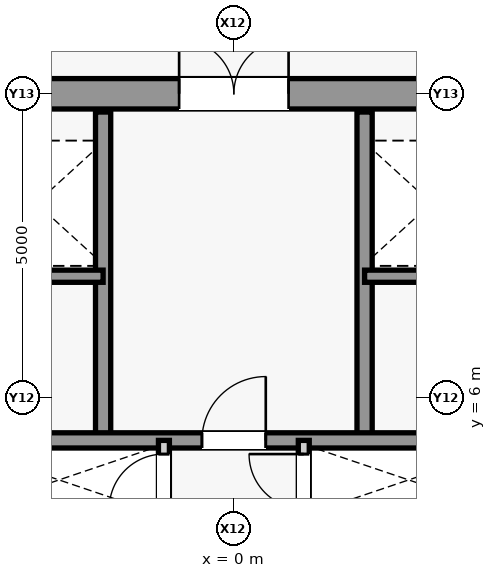
"""IFC4 building model, lengths in metres.
Left out: names, types, materials, properties, quantities, classifications, styles, units other than length and angle.
Written with IfcOpenShell. Run it as: python <this file> out.ifc"""

import sys

from ifc_helpers import new_model, si_unit, direction, frame, frame_2d, origin, place, context, subcontext, project, spatial, rectangle, extrude, source, transform, mapped, element, fill, save


model = new_model("IFC4")
c1 = context("Model", 3, precision=1e-05, world=origin(), true_north=direction((0.0, 1.0)))
c2 = subcontext(c1, "Body", "Model", "MODEL_VIEW")
j1 = project(units=[si_unit("LENGTHUNIT", "METRE"), si_unit("PLANEANGLEUNIT", "RADIAN")], contexts=[c1])
p1 = place(None, origin())
s1 = spatial("IfcSite", under=j1, at=p1, CompositionType="ELEMENT")
p2 = place(p1, origin())
s2 = spatial("IfcBuilding", under=s1, at=p2, CompositionType="ELEMENT")
p3 = place(p2, frame((0.0, 0.0, 32.6)))
s3 = spatial("IfcBuildingStorey", under=s2, at=p3, CompositionType="ELEMENT", Elevation=32.6)
m1 = source(origin(), c2, "Body", "SweptSolid", [
    extrude(rectangle(XDim=9.2, YDim=0.5, at=frame_2d((4.6, 0.0))), origin(), (0.0, 0.0, 1.0), 3.94),
])
p4 = place(p3, frame((-4.6, 11.0, 0.0), z_axis=(0.0, 0.0, 1.0), x_axis=(1.0, 0.0, 0.0)))
e1 = element("IfcWall", 1, at=p4, inside=s3, PredefinedType="SHEAR", context=c2, shape_type="MappedRepresentation", body=[
    mapped(m1, transform((0.0, 0.0, 0.0), scale=1.0)),
])
m2 = source(origin(), c2, "Body", "SweptSolid", [
    extrude(rectangle(XDim=1.8, YDim=2.25, at=frame_2d((0.9, 1.125))), frame((0.0, 0.26, 0.0), z_axis=(0.0, -1.0, 0.0), x_axis=(1.0, 0.0, 0.0)), (0.0, 0.0, 1.0), 0.52),
])
p5 = place(p4, frame((3.7, 0.0, 0.0)))
e2 = element("IfcOpeningElement", 2, at=p5, cuts=e1, PredefinedType="OPENING", context=c2, shape_type="MappedRepresentation", body=[
    mapped(m2, transform((0.0, 0.0, 0.0), scale=1.0)),
])
m3 = source(origin(), c2, "Body", "SweptSolid", [
    extrude(rectangle(XDim=5.4, YDim=0.25, at=frame_2d((2.7, 0.0))), origin(), (0.0, 0.0, 1.0), 3.94),
])
for number, where, z_axis, x_axis in (
    (3, (-2.15, 5.3, 0.0), (0.0, 0.0, 1.0), (0.0, 1.0, 0.0)),
    (4, (2.15, 5.3, 0.0), (0.0, 0.0, 1.0), (0.0, 1.0, 0.0)),
):
    element("IfcWall", number, at=place(p3, frame(where, z_axis=z_axis, x_axis=x_axis)), inside=s3, PredefinedType="SHEAR", context=c2, shape_type="MappedRepresentation", body=[
        mapped(m3, transform((0.0, 0.0, 0.0), scale=1.0)),
    ])
m4 = source(origin(), c2, "Body", "SweptSolid", [
    extrude(rectangle(XDim=2.45, YDim=0.2, at=frame_2d((1.225, 0.0))), origin(), (0.0, 0.0, 1.0), 3.94),
])
for number, where, z_axis, x_axis in (
    (5, (-4.6, 8.0, 0.0), (0.0, 0.0, 1.0), (1.0, 0.0, 0.0)),
    (6, (2.15, 8.0, 0.0), (0.0, 0.0, 1.0), (1.0, 0.0, 0.0)),
):
    element("IfcWall", number, at=place(p3, frame(where, z_axis=z_axis, x_axis=x_axis)), inside=s3, PredefinedType="SHEAR", context=c2, shape_type="MappedRepresentation", body=[
        mapped(m4, transform((0.0, 0.0, 0.0), scale=1.0)),
    ])
m5 = source(origin(), c2, "Body", "SweptSolid", [
    extrude(rectangle(XDim=9.2, YDim=0.25, at=frame_2d((4.6, 0.0))), origin(), (0.0, 0.0, 1.0), 3.94),
])
p6 = place(p3, frame((-4.6, 5.3, 0.0), z_axis=(0.0, 0.0, 1.0), x_axis=(1.0, 0.0, 0.0)))
e7 = element("IfcWall", 7, at=p6, inside=s3, PredefinedType="SHEAR", context=c2, shape_type="MappedRepresentation", body=[
    mapped(m5, transform((0.0, 0.0, 0.0), scale=1.0)),
])
m6 = source(origin(), c2, "Body", "SweptSolid", [
    extrude(rectangle(XDim=1.05, YDim=2.2, at=frame_2d((0.525, 1.1))), frame((0.0, 0.135, 0.0), z_axis=(0.0, -1.0, 0.0), x_axis=(1.0, 0.0, 0.0)), (0.0, 0.0, 1.0), 0.27),
])
p7 = place(p6, frame((4.075, 0.0, 0.0)))
e8 = element("IfcOpeningElement", 8, at=p7, cuts=e7, PredefinedType="OPENING", context=c2, shape_type="MappedRepresentation", body=[
    mapped(m6, transform((0.0, 0.0, 0.0), scale=1.0)),
])
m7 = source(origin(), c2, "Body", "SweptSolid", [
    extrude(rectangle(XDim=10.6, YDim=0.18, at=frame_2d((5.3, 0.0))), origin(), (0.0, 0.0, 1.0), 3.94),
])
p8 = place(p3, frame((-1.15, -5.3, 0.0), z_axis=(0.0, 0.0, 1.0), x_axis=(0.0, 1.0, 0.0)))
e9 = element("IfcWall", 9, at=p8, inside=s3, PredefinedType="PARTITIONING", context=c2, shape_type="MappedRepresentation", body=[
    mapped(m7, transform((0.0, 0.0, 0.0), scale=1.0)),
])
m8 = source(origin(), c2, "Body", "SweptSolid", [
    extrude(rectangle(XDim=0.9, YDim=2.15, at=frame_2d((0.45, 1.075))), frame((0.0, 0.1, 0.0), z_axis=(0.0, -1.0, 0.0), x_axis=(1.0, 0.0, 0.0)), (0.0, 0.0, 1.0), 0.2),
])
p9 = place(p8, frame((1.3, 0.0, 0.0)))
e10 = element("IfcOpeningElement", 10, at=p9, cuts=e9, PredefinedType="OPENING", context=c2, shape_type="MappedRepresentation", body=[
    mapped(m8, transform((0.0, 0.0, 0.0), scale=1.0)),
])
p10 = place(p8, frame((4.9, 0.0, 0.0)))
e11 = element("IfcOpeningElement", 11, at=p10, cuts=e9, PredefinedType="OPENING", context=c2, shape_type="MappedRepresentation", body=[
    mapped(m8, transform((0.0, 0.0, 0.0), scale=1.0)),
])
p11 = place(p8, frame((7.8, 0.0, 0.0)))
e12 = element("IfcOpeningElement", 12, at=p11, cuts=e9, PredefinedType="OPENING", context=c2, shape_type="MappedRepresentation", body=[
    mapped(m8, transform((0.0, 0.0, 0.0), scale=1.0)),
])
p12 = place(p8, frame((9.475, 0.0, 0.0)))
e13 = element("IfcOpeningElement", 13, at=p12, cuts=e9, PredefinedType="OPENING", context=c2, shape_type="MappedRepresentation", body=[
    mapped(m8, transform((0.0, 0.0, 0.0), scale=1.0)),
])
p13 = place(p3, frame((1.15, -5.3, 0.0), z_axis=(0.0, 0.0, 1.0), x_axis=(0.0, 1.0, 0.0)))
e14 = element("IfcWall", 14, at=p13, inside=s3, PredefinedType="PARTITIONING", context=c2, shape_type="MappedRepresentation", body=[
    mapped(m7, transform((0.0, 0.0, 0.0), scale=1.0)),
])
p14 = place(p13, frame((4.2, 0.0, 0.0)))
e15 = element("IfcOpeningElement", 15, at=p14, cuts=e14, PredefinedType="OPENING", context=c2, shape_type="MappedRepresentation", body=[
    mapped(m8, transform((0.0, 0.0, 0.0), scale=1.0)),
])
p15 = place(p13, frame((9.475, 0.0, 0.0)))
e16 = element("IfcOpeningElement", 16, at=p15, cuts=e14, PredefinedType="OPENING", context=c2, shape_type="MappedRepresentation", body=[
    mapped(m8, transform((0.0, 0.0, 0.0), scale=1.0)),
])
m9 = source(origin(), c2, "Body", "SweptSolid", [
    extrude(rectangle(XDim=1.05, YDim=2.2, at=frame_2d((0.525, 1.1))), frame((0.0, 0.025, 0.0), z_axis=(0.0, -1.0, 0.0), x_axis=(1.0, 0.0, 0.0)), (0.0, 0.0, 1.0), 0.05),
])
p16 = place(p7, origin())
e17 = element("IfcDoor", 17, at=p16, inside=s3, OperationType="SINGLE_SWING_RIGHT", PredefinedType="DOOR", context=c2, shape_type="MappedRepresentation", body=[
    mapped(m9, transform((0.0, 0.0, 0.0), scale=1.0)),
])
fill(e8, e17)
m10 = source(origin(), c2, "Body", "SweptSolid", [
    extrude(rectangle(XDim=1.8, YDim=2.25, at=frame_2d((0.9, 1.125))), frame((0.0, 0.025, 0.0), z_axis=(0.0, -1.0, 0.0), x_axis=(1.0, 0.0, 0.0)), (0.0, 0.0, 1.0), 0.05),
])
p17 = place(p5, origin())
e18 = element("IfcDoor", 18, at=p17, inside=s3, OperationType="SINGLE_SWING_RIGHT", PredefinedType="DOOR", context=c2, shape_type="MappedRepresentation", body=[
    mapped(m10, transform((0.0, 0.0, 0.0), scale=1.0)),
])
fill(e2, e18)
m11 = source(origin(), c2, "Body", "SweptSolid", [
    extrude(rectangle(XDim=0.9, YDim=2.15, at=frame_2d((0.45, 1.075))), frame((0.0, 0.025, 0.0), z_axis=(0.0, -1.0, 0.0), x_axis=(1.0, 0.0, 0.0)), (0.0, 0.0, 1.0), 0.05),
])
p18 = place(p12, origin())
e19 = element("IfcDoor", 19, at=p18, inside=s3, OperationType="SINGLE_SWING_LEFT", PredefinedType="DOOR", context=c2, shape_type="MappedRepresentation", body=[
    mapped(m11, transform((0.0, 0.0, 0.0), scale=1.0)),
])
fill(e13, e19)
p19 = place(p15, origin())
e20 = element("IfcDoor", 20, at=p19, inside=s3, OperationType="SINGLE_SWING_RIGHT", PredefinedType="DOOR", context=c2, shape_type="MappedRepresentation", body=[
    mapped(m11, transform((0.0, 0.0, 0.0), scale=1.0)),
])
fill(e16, e20)
save(model, sys.argv[1])
